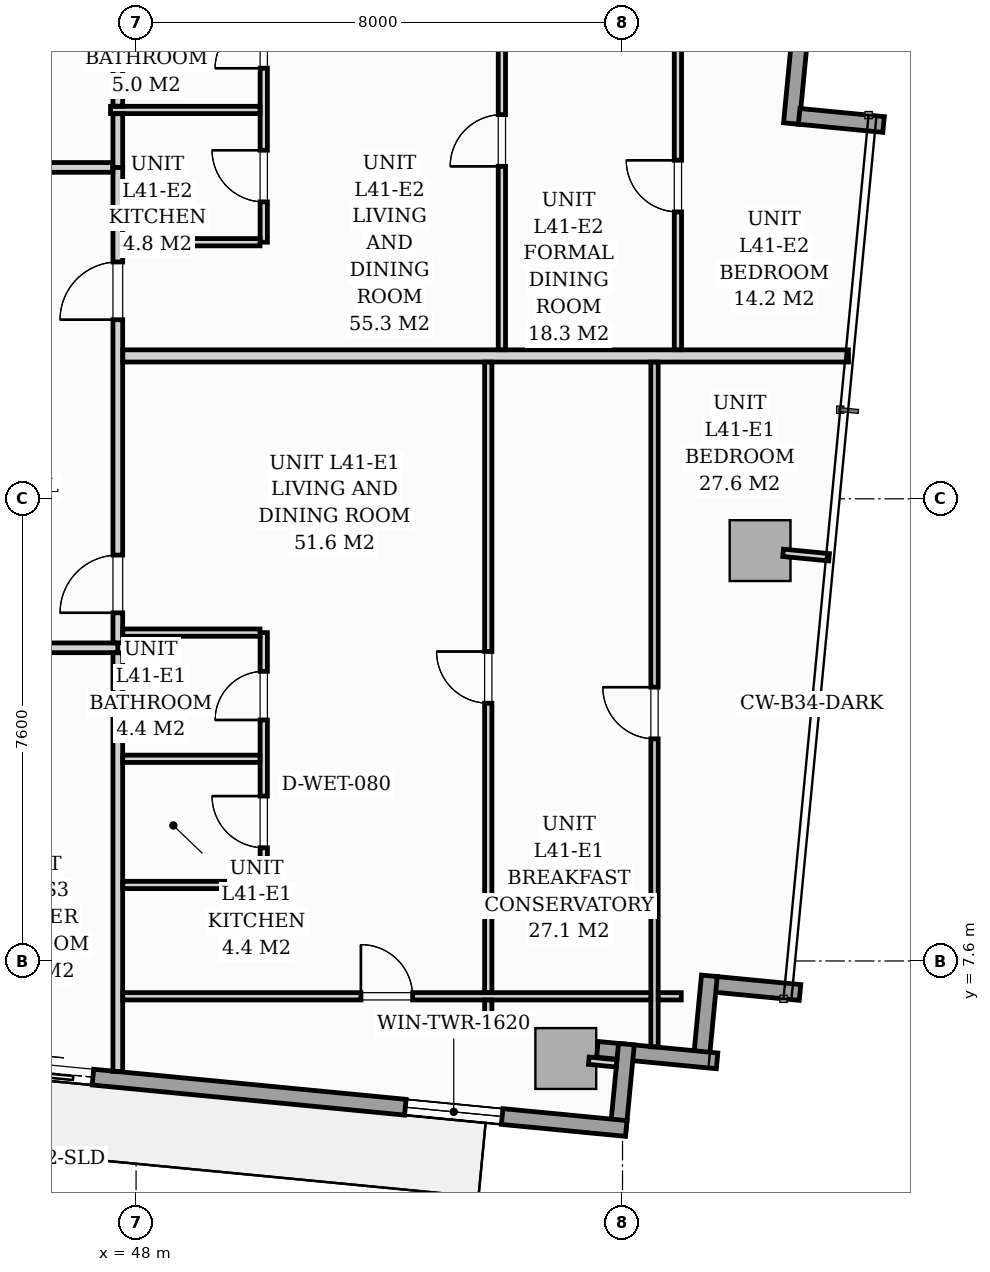
"""IFC4 building model, lengths in metres.
Left out: names, types, materials, properties, quantities, classifications, styles, units other than length and angle.
Written with IfcOpenShell. Run it as: python <this file> out.ifc"""

import sys

from ifc_helpers import new_model, si_unit, direction, frame, frame_2d, origin, origin_2d, place, context, subcontext, project, spatial, rectangle, extrude, source, transform, mapped, element, fill, save


model = new_model("IFC4")
c1 = context("Model", 3, precision=1e-05, world=origin(), true_north=direction((0.0, 1.0)))
c2 = subcontext(c1, "Body", "Model", "MODEL_VIEW")
j1 = project(units=[si_unit("LENGTHUNIT", "METRE"), si_unit("PLANEANGLEUNIT", "RADIAN")], contexts=[c1])
p1 = place(None, origin())
s1 = spatial("IfcSite", under=j1, at=p1, CompositionType="ELEMENT")
p2 = place(p1, origin())
s2 = spatial("IfcBuilding", under=s1, at=p2, CompositionType="ELEMENT")
p3 = place(p2, frame((0.0, 0.0, 143.8)))
s3 = spatial("IfcBuildingStorey", under=s2, at=p3, CompositionType="ELEMENT", Elevation=143.8)
m1 = source(origin(), c2, "Body", "SweptSolid", [
    extrude(rectangle(XDim=1.0, YDim=1.0, at=origin_2d()), origin(), (0.0, 0.0, 1.0), 3.196),
])
for number, where, z_axis, x_axis in (
    (1, (55.067, 5.996, 0.002), (0.0, 0.0, 1.0), (0.995, -0.096, 0.0)),
    (2, (58.262, 14.348, 0.002), (0.0, 0.0, 1.0), (0.995, -0.096, 0.0)),
):
    element("IfcColumn", number, at=place(p3, frame(where, z_axis=z_axis, x_axis=x_axis)), inside=s3, PredefinedType="COLUMN", context=c2, shape_type="MappedRepresentation", body=[
        mapped(m1, transform((0.0, 0.0, 0.0), scale=1.0)),
    ])
for number, where, z_axis, x_axis in (
    (3, (58.912, 22.76, 0.0), (0.0, 0.0, 1.0), (-0.096, -0.995, 0.0)),
    (4, (58.905, 21.49, 0.0), (0.0, 0.0, 1.0), (0.995, -0.096, 0.0)),
):
    element("IfcWall", number, at=place(p3, frame(where, z_axis=z_axis, x_axis=x_axis)), inside=s3, PredefinedType="STANDARD", context=c2, shape_type="SweptSolid", body=[
        extrude(rectangle(XDim=1.395, YDim=0.26, at=frame_2d((0.698, 0.0))), origin(), (0.0, 0.0, 1.0), 2.94),
    ])
for number, where, z_axis, x_axis in (
    (5, (58.919, 7.082, 0.0), (0.0, 0.0, 1.0), (-0.995, 0.096, 0.0)),
    (6, (57.428, 7.356, 0.0), (0.0, 0.0, 1.0), (-0.096, -0.995, 0.0)),
):
    element("IfcWall", number, at=place(p3, frame(where, z_axis=z_axis, x_axis=x_axis)), inside=s3, PredefinedType="STANDARD", context=c2, shape_type="SweptSolid", body=[
        extrude(rectangle(XDim=1.395, YDim=0.26, at=frame_2d((0.697, 0.0))), origin(), (0.0, 0.0, 1.0), 2.94),
    ])
p4 = place(p3, frame((57.555, 5.958, 0.0), z_axis=(0.0, 0.0, 1.0), x_axis=(-0.995401789159, 0.095787672171, 0.0)))
e7 = element("IfcWall", 7, at=p4, inside=s3, PredefinedType="STANDARD", context=c2, shape_type="SweptSolid", body=[
    extrude(rectangle(XDim=1.978, YDim=0.26, at=frame_2d((0.989, 0.0))), origin(), (0.0, 0.0, 1.0), 2.94),
])
p5 = place(p3, frame((56.064, 6.232, 0.0), z_axis=(0.0, 0.0, 1.0), x_axis=(-0.09589913835, -0.995391056452, 0.0)))
e8 = element("IfcWall", 8, at=p5, inside=s3, PredefinedType="STANDARD", context=c2, shape_type="SweptSolid", body=[
    extrude(rectangle(XDim=1.395, YDim=0.26, at=frame_2d((0.698, 0.0))), origin(), (0.0, 0.0, 1.0), 2.94),
])
p6 = place(p3, frame((56.061, 4.845, 0.0), z_axis=(0.0, 0.0, 1.0), x_axis=(-0.995395976631, 0.095848055311, 0.0)))
e9 = element("IfcWall", 9, at=p6, inside=s3, PredefinedType="STANDARD", context=c2, shape_type="SweptSolid", body=[
    extrude(rectangle(XDim=17.01, YDim=0.26, at=frame_2d((8.505, 0.0))), origin(), (0.0, 0.0, 1.0), 2.94),
])
p7 = place(p6, frame((8.811, 0.0, 0.0)))
e10 = element("IfcOpeningElement", 10, at=p7, cuts=e9, PredefinedType="OPENING", context=c2, shape_type="SweptSolid", body=[
    extrude(rectangle(XDim=1.8, YDim=2.06, at=frame_2d((0.9, 1.03))), frame((0.0, 0.14, 0.0), z_axis=(0.0, -1.0, 0.0), x_axis=(1.0, 0.0, 0.0)), (0.0, 0.0, 1.0), 0.28),
])
p8 = place(p6, frame((2.05, 0.0, 0.65)))
e11 = element("IfcOpeningElement", 11, at=p8, cuts=e9, PredefinedType="OPENING", context=c2, shape_type="SweptSolid", body=[
    extrude(rectangle(XDim=1.6, YDim=1.5, at=frame_2d((0.8, 0.75))), frame((0.0, 0.14, 0.0), z_axis=(0.0, -1.0, 0.0), x_axis=(1.0, 0.0, 0.0)), (0.0, 0.0, 1.0), 0.28),
])
p9 = place(p3, frame((22.05, 12.75, 0.0), z_axis=(0.0, 0.0, 1.0), x_axis=(1.0, 0.0, 0.0)))
e12 = element("IfcWall", 12, at=p9, inside=s3, PredefinedType="PARTITIONING", context=c2, shape_type="SweptSolid", body=[
    extrude(rectangle(XDim=25.65, YDim=0.16, at=frame_2d((12.825, 0.0))), origin(), (0.0, 0.0, 1.0), 2.94),
])
p10 = place(p9, frame((1.312, 0.0, 0.0)))
e13 = element("IfcOpeningElement", 13, at=p10, cuts=e12, PredefinedType="OPENING", context=c2, shape_type="SweptSolid", body=[
    extrude(rectangle(XDim=0.95, YDim=2.06, at=frame_2d((0.475, 1.03))), frame((0.0, 0.09, 0.0), z_axis=(0.0, -1.0, 0.0), x_axis=(1.0, 0.0, 0.0)), (0.0, 0.0, 1.0), 0.18),
])
p11 = place(p9, frame((8.281, 0.0, 0.0)))
e14 = element("IfcOpeningElement", 14, at=p11, cuts=e12, PredefinedType="OPENING", context=c2, shape_type="SweptSolid", body=[
    extrude(rectangle(XDim=0.95, YDim=2.06, at=frame_2d((0.475, 1.03))), frame((0.0, 0.09, 0.0), z_axis=(0.0, -1.0, 0.0), x_axis=(1.0, 0.0, 0.0)), (0.0, 0.0, 1.0), 0.18),
])
p12 = place(p9, frame((17.268, 0.0, 0.0)))
e15 = element("IfcOpeningElement", 15, at=p12, cuts=e12, PredefinedType="OPENING", context=c2, shape_type="SweptSolid", body=[
    extrude(rectangle(XDim=0.95, YDim=2.06, at=frame_2d((0.475, 1.03))), frame((0.0, 0.09, 0.0), z_axis=(0.0, -1.0, 0.0), x_axis=(1.0, 0.0, 0.0)), (0.0, 0.0, 1.0), 0.18),
])
p13 = place(p3, frame((47.7, 5.783, 0.0), z_axis=(0.0, 0.0, 1.0), x_axis=(0.0, 1.0, 0.0)))
e16 = element("IfcWall", 16, at=p13, inside=s3, PredefinedType="PARTITIONING", context=c2, shape_type="SweptSolid", body=[
    extrude(rectangle(XDim=6.885, YDim=0.16, at=frame_2d((3.442, 0.0))), origin(), (0.0, 0.0, 1.0), 2.94),
])
p14 = place(p3, frame((47.7, 12.832, 0.0), z_axis=(0.0, 0.0, 1.0), x_axis=(0.0, 1.0, 0.0)))
e17 = element("IfcWall", 17, at=p14, inside=s3, PredefinedType="PARTITIONING", context=c2, shape_type="SweptSolid", body=[
    extrude(rectangle(XDim=7.818, YDim=0.16, at=frame_2d((3.909, 0.0))), origin(), (0.0, 0.0, 1.0), 2.94),
])
p15 = place(p14, frame((0.493, 0.0, 0.0)))
e18 = element("IfcOpeningElement", 18, at=p15, cuts=e17, PredefinedType="OPENING", context=c2, shape_type="SweptSolid", body=[
    extrude(rectangle(XDim=0.95, YDim=2.06, at=frame_2d((0.475, 1.03))), frame((0.0, 0.09, 0.0), z_axis=(0.0, -1.0, 0.0), x_axis=(1.0, 0.0, 0.0)), (0.0, 0.0, 1.0), 0.18),
])
p16 = place(p14, frame((5.313, 0.0, 0.0)))
e19 = element("IfcOpeningElement", 19, at=p16, cuts=e17, PredefinedType="OPENING", context=c2, shape_type="SweptSolid", body=[
    extrude(rectangle(XDim=0.95, YDim=2.06, at=frame_2d((0.475, 1.03))), frame((0.0, 0.09, 0.0), z_axis=(0.0, -1.0, 0.0), x_axis=(1.0, 0.0, 0.0)), (0.0, 0.0, 1.0), 0.18),
])
p17 = place(p3, frame((45.902, 20.65, 0.0), z_axis=(0.0, 0.0, 1.0), x_axis=(1.0, 0.0, 0.0)))
e20 = element("IfcWall", 20, at=p17, inside=s3, PredefinedType="PARTITIONING", context=c2, shape_type="SweptSolid", body=[
    extrude(rectangle(XDim=1.716, YDim=0.16, at=frame_2d((0.858, 0.0))), origin(), (0.0, 0.0, 1.0), 2.94),
])
p18 = place(p3, frame((47.782, 17.55, 0.0), z_axis=(0.0, 0.0, 1.0), x_axis=(1.0, 0.0, 0.0)))
e21 = element("IfcWall", 21, at=p18, inside=s3, PredefinedType="PARTITIONING", context=c2, shape_type="SweptSolid", body=[
    extrude(rectangle(XDim=11.934, YDim=0.2, at=frame_2d((5.967, 0.0))), origin(), (0.0, 0.0, 1.0), 2.94),
])
p19 = place(p3, frame((50.1, 8.85, 0.0), z_axis=(0.0, 0.0, 1.0), x_axis=(0.0, 1.0, 0.0)))
e22 = element("IfcWall", 22, at=p19, inside=s3, PredefinedType="PARTITIONING", context=c2, shape_type="SweptSolid", body=[
    extrude(rectangle(XDim=4.15, YDim=0.12, at=frame_2d((2.075, 0.0))), origin(), (0.0, 0.0, 1.0), 2.94),
])
p20 = place(p19, frame((0.612, 0.0, 0.0)))
e23 = element("IfcOpeningElement", 23, at=p20, cuts=e22, PredefinedType="OPENING", context=c2, shape_type="SweptSolid", body=[
    extrude(rectangle(XDim=0.85, YDim=2.05, at=frame_2d((0.425, 1.025))), frame((0.0, 0.07, 0.0), z_axis=(0.0, -1.0, 0.0), x_axis=(1.0, 0.0, 0.0)), (0.0, 0.0, 1.0), 0.14),
])
p21 = place(p19, frame((2.713, 0.0, 0.0)))
e24 = element("IfcOpeningElement", 24, at=p21, cuts=e22, PredefinedType="OPENING", context=c2, shape_type="SweptSolid", body=[
    extrude(rectangle(XDim=0.8, YDim=2.02, at=frame_2d((0.4, 1.01))), frame((0.0, 0.07, 0.0), z_axis=(0.0, -1.0, 0.0), x_axis=(1.0, 0.0, 0.0)), (0.0, 0.0, 1.0), 0.14),
])
for number, where, z_axis, x_axis in (
    (25, (47.782, 10.925, 0.0), (0.0, 0.0, 1.0), (1.0, 0.0, 0.0)),
    (26, (47.782, 8.85, 0.0), (0.0, 0.0, 1.0), (1.0, 0.0, 0.0)),
    (27, (47.782, 13.0, 0.0), (0.0, 0.0, 1.0), (1.0, 0.0, 0.0)),
):
    element("IfcWall", number, at=place(p3, frame(where, z_axis=z_axis, x_axis=x_axis)), inside=s3, PredefinedType="PARTITIONING", context=c2, shape_type="SweptSolid", body=[
        extrude(rectangle(XDim=2.256, YDim=0.12, at=frame_2d((1.128, 0.0))), origin(), (0.0, 0.0, 1.0), 2.94),
    ])
p22 = place(p3, frame((56.526, 6.189, 0.0), z_axis=(0.0, 0.0, 1.0), x_axis=(0.0, 1.0, 0.0)))
e28 = element("IfcWall", 28, at=p22, inside=s3, PredefinedType="PARTITIONING", context=c2, shape_type="SweptSolid", body=[
    extrude(rectangle(XDim=11.259, YDim=0.12, at=frame_2d((5.629, 0.0))), origin(), (0.0, 0.0, 1.0), 2.94),
])
p23 = place(p22, frame((5.064, 0.0, 0.0)))
e29 = element("IfcOpeningElement", 29, at=p23, cuts=e28, PredefinedType="OPENING", context=c2, shape_type="SweptSolid", body=[
    extrude(rectangle(XDim=0.85, YDim=2.05, at=frame_2d((0.425, 1.025))), frame((0.0, 0.07, 0.0), z_axis=(0.0, -1.0, 0.0), x_axis=(1.0, 0.0, 0.0)), (0.0, 0.0, 1.0), 0.14),
])
p24 = place(p3, frame((47.782, 7.019, 0.0), z_axis=(0.0, 0.0, 1.0), x_axis=(1.0, 0.0, 0.0)))
e30 = element("IfcWall", 30, at=p24, inside=s3, PredefinedType="PARTITIONING", context=c2, shape_type="SweptSolid", body=[
    extrude(rectangle(XDim=8.682, YDim=0.12, at=frame_2d((4.341, 0.0))), origin(), (0.0, 0.0, 1.0), 2.94),
])
p25 = place(p24, frame((3.916, 0.0, 0.0)))
e31 = element("IfcOpeningElement", 31, at=p25, cuts=e30, PredefinedType="OPENING", context=c2, shape_type="SweptSolid", body=[
    extrude(rectangle(XDim=0.85, YDim=2.05, at=frame_2d((0.425, 1.025))), frame((0.0, 0.07, 0.0), z_axis=(0.0, -1.0, 0.0), x_axis=(1.0, 0.0, 0.0)), (0.0, 0.0, 1.0), 0.14),
])
p26 = place(p3, frame((56.588, 7.019, 0.0), z_axis=(0.0, 0.0, 1.0), x_axis=(1.0, 0.0, 0.0)))
e32 = element("IfcWall", 32, at=p26, inside=s3, PredefinedType="PARTITIONING", context=c2, shape_type="SweptSolid", body=[
    extrude(rectangle(XDim=0.378, YDim=0.12, at=frame_2d((0.189, 0.0))), origin(), (0.0, 0.0, 1.0), 2.94),
])
p27 = place(p3, frame((53.792, 6.579, 0.0), z_axis=(0.0, 0.0, 1.0), x_axis=(0.0, 1.0, 0.0)))
e33 = element("IfcWall", 33, at=p27, inside=s3, PredefinedType="PARTITIONING", context=c2, shape_type="SweptSolid", body=[
    extrude(rectangle(XDim=0.378, YDim=0.12, at=frame_2d((0.189, 0.0))), origin(), (0.0, 0.0, 1.0), 2.94),
])
p28 = place(p3, frame((53.792, 7.081, 0.0), z_axis=(0.0, 0.0, 1.0), x_axis=(0.0, 1.0, 0.0)))
e34 = element("IfcWall", 34, at=p28, inside=s3, PredefinedType="PARTITIONING", context=c2, shape_type="SweptSolid", body=[
    extrude(rectangle(XDim=10.367, YDim=0.12, at=frame_2d((5.184, 0.0))), origin(), (0.0, 0.0, 1.0), 2.94),
])
p29 = place(p28, frame((4.758, 0.0, 0.0)))
e35 = element("IfcOpeningElement", 35, at=p29, cuts=e34, PredefinedType="OPENING", context=c2, shape_type="SweptSolid", body=[
    extrude(rectangle(XDim=0.85, YDim=2.05, at=frame_2d((0.425, 1.025))), frame((0.0, 0.07, 0.0), z_axis=(0.0, -1.0, 0.0), x_axis=(1.0, 0.0, 0.0)), (0.0, 0.0, 1.0), 0.14),
])
p30 = place(p3, frame((50.1, 19.42, 0.0), z_axis=(0.0, 0.0, 1.0), x_axis=(0.0, 1.0, 0.0)))
e36 = element("IfcWall", 36, at=p30, inside=s3, PredefinedType="PARTITIONING", context=c2, shape_type="SweptSolid", body=[
    extrude(rectangle(XDim=4.35, YDim=0.12, at=frame_2d((2.175, 0.0))), origin(), (0.0, 0.0, 1.0), 2.94),
])
p31 = place(p30, frame((0.663, 0.0, 0.0)))
e37 = element("IfcOpeningElement", 37, at=p31, cuts=e36, PredefinedType="OPENING", context=c2, shape_type="SweptSolid", body=[
    extrude(rectangle(XDim=0.85, YDim=2.05, at=frame_2d((0.425, 1.025))), frame((0.0, 0.07, 0.0), z_axis=(0.0, -1.0, 0.0), x_axis=(1.0, 0.0, 0.0)), (0.0, 0.0, 1.0), 0.14),
])
p32 = place(p30, frame((2.862, 0.0, 0.0)))
e38 = element("IfcOpeningElement", 38, at=p32, cuts=e36, PredefinedType="OPENING", context=c2, shape_type="SweptSolid", body=[
    extrude(rectangle(XDim=0.8, YDim=2.02, at=frame_2d((0.4, 1.01))), frame((0.0, 0.07, 0.0), z_axis=(0.0, -1.0, 0.0), x_axis=(1.0, 0.0, 0.0)), (0.0, 0.0, 1.0), 0.14),
])
p33 = place(p3, frame((47.58, 21.595, 0.0), z_axis=(0.0, 0.0, 1.0), x_axis=(1.0, 0.0, 0.0)))
e39 = element("IfcWall", 39, at=p33, inside=s3, PredefinedType="PARTITIONING", context=c2, shape_type="SweptSolid", body=[
    extrude(rectangle(XDim=2.458, YDim=0.12, at=frame_2d((1.229, 0.0))), origin(), (0.0, 0.0, 1.0), 2.94),
])
p34 = place(p3, frame((47.782, 19.42, 0.0), z_axis=(0.0, 0.0, 1.0), x_axis=(1.0, 0.0, 0.0)))
e40 = element("IfcWall", 40, at=p34, inside=s3, PredefinedType="PARTITIONING", context=c2, shape_type="SweptSolid", body=[
    extrude(rectangle(XDim=2.256, YDim=0.12, at=frame_2d((1.128, 0.0))), origin(), (0.0, 0.0, 1.0), 2.94),
])
p35 = place(p3, frame((47.7, 20.65, 0.0), z_axis=(0.0, 0.0, 1.0), x_axis=(0.0, 1.0, 0.0)))
e41 = element("IfcWall", 41, at=p35, inside=s3, PredefinedType="PARTITIONING", context=c2, shape_type="SweptSolid", body=[
    extrude(rectangle(XDim=0.883, YDim=0.16, at=frame_2d((0.441, 0.0))), origin(), (0.0, 0.0, 1.0), 2.94),
])
p36 = place(p3, frame((47.7, 21.657, 0.0), z_axis=(0.0, 0.0, 1.0), x_axis=(0.0, 1.0, 0.0)))
e42 = element("IfcWall", 42, at=p36, inside=s3, PredefinedType="PARTITIONING", context=c2, shape_type="SweptSolid", body=[
    extrude(rectangle(XDim=2.051, YDim=0.16, at=frame_2d((1.025, 0.0))), origin(), (0.0, 0.0, 1.0), 2.94),
])
p37 = place(p3, frame((56.911, 17.652, 0.0), z_axis=(0.0, 0.0, 1.0), x_axis=(0.0, 1.0, 0.0)))
e43 = element("IfcWall", 43, at=p37, inside=s3, PredefinedType="PARTITIONING", context=c2, shape_type="SweptSolid", body=[
    extrude(rectangle(XDim=6.408, YDim=0.12, at=frame_2d((3.204, 0.0))), origin(), (0.0, 0.0, 1.0), 2.383),
])
p38 = place(p37, frame((2.266, 0.0, 0.0)))
e44 = element("IfcOpeningElement", 44, at=p38, cuts=e43, PredefinedType="OPENING", context=c2, shape_type="SweptSolid", body=[
    extrude(rectangle(XDim=0.85, YDim=2.05, at=frame_2d((0.425, 1.025))), frame((0.0, 0.07, 0.0), z_axis=(0.0, -1.0, 0.0), x_axis=(1.0, 0.0, 0.0)), (0.0, 0.0, 1.0), 0.14),
])
p39 = place(p3, frame((54.016, 17.652, 0.0), z_axis=(0.0, 0.0, 1.0), x_axis=(0.0, 1.0, 0.0)))
e45 = element("IfcWall", 45, at=p39, inside=s3, PredefinedType="PARTITIONING", context=c2, shape_type="SweptSolid", body=[
    extrude(rectangle(XDim=6.687, YDim=0.12, at=frame_2d((3.344, 0.0))), origin(), (0.0, 0.0, 1.0), 2.94),
])
p40 = place(p39, frame((3.016, 0.0, 0.0)))
e46 = element("IfcOpeningElement", 46, at=p40, cuts=e45, PredefinedType="OPENING", context=c2, shape_type="SweptSolid", body=[
    extrude(rectangle(XDim=0.85, YDim=2.05, at=frame_2d((0.425, 1.025))), frame((0.0, 0.07, 0.0), z_axis=(0.0, -1.0, 0.0), x_axis=(1.0, 0.0, 0.0)), (0.0, 0.0, 1.0), 0.14),
])
p41 = place(p3, frame((55.445, 5.96, 0.0), z_axis=(0.0, 0.0, 1.0), x_axis=(0.995384576284, -0.09596637586, 0.0)))
e47 = element("IfcWall", 47, at=p41, inside=s3, PredefinedType="PARTITIONING", context=c2, shape_type="SweptSolid", body=[
    extrude(rectangle(XDim=0.458, YDim=0.12, at=frame_2d((0.229, 0.0))), origin(), (0.0, 0.0, 1.0), 2.94),
])
p42 = place(p3, frame((58.64, 14.312, 0.0), z_axis=(0.0, 0.0, 1.0), x_axis=(0.995377786728, -0.096036772582, 0.0)))
e48 = element("IfcWall", 48, at=p42, inside=s3, PredefinedType="PARTITIONING", context=c2, shape_type="SweptSolid", body=[
    extrude(rectangle(XDim=0.76, YDim=0.12, at=frame_2d((0.38, 0.0))), origin(), (0.0, 0.0, 1.0), 2.94),
])
m2 = source(origin(), c2, "Body", "SweptSolid", [
    extrude(rectangle(XDim=1.8, YDim=2.06, at=frame_2d((0.9, 1.03))), frame((0.0, 0.025, 0.0), z_axis=(0.0, -1.0, 0.0), x_axis=(1.0, 0.0, 0.0)), (0.0, 0.0, 1.0), 0.05),
])
p43 = place(p7, origin())
e49 = element("IfcDoor", 49, at=p43, inside=s3, OperationType="SLIDING_TO_RIGHT", PredefinedType="DOOR", context=c2, shape_type="MappedRepresentation", body=[
    mapped(m2, transform((0.0, 0.0, 0.0), scale=1.0)),
])
fill(e10, e49)
m3 = source(origin(), c2, "Body", "SweptSolid", [
    extrude(rectangle(XDim=1.6, YDim=1.5, at=frame_2d((0.8, 0.75))), frame((0.0, 0.03, 0.0), z_axis=(0.0, -1.0, 0.0), x_axis=(1.0, 0.0, 0.0)), (0.0, 0.0, 1.0), 0.06),
])
p44 = place(p8, origin())
e50 = element("IfcWindow", 50, at=p44, inside=s3, PartitioningType="SINGLE_PANEL", PredefinedType="WINDOW", context=c2, shape_type="MappedRepresentation", body=[
    mapped(m3, transform((0.0, 0.0, 0.0), scale=1.0)),
])
fill(e11, e50)
m4 = source(origin(), c2, "Body", "SweptSolid", [
    extrude(rectangle(XDim=0.95, YDim=2.06, at=frame_2d((0.475, 1.03))), frame((0.0, 0.025, 0.0), z_axis=(0.0, -1.0, 0.0), x_axis=(1.0, 0.0, 0.0)), (0.0, 0.0, 1.0), 0.05),
])
p45 = place(p15, origin())
e51 = element("IfcDoor", 51, at=p45, inside=s3, OperationType="SINGLE_SWING_LEFT", PredefinedType="DOOR", context=c2, shape_type="MappedRepresentation", body=[
    mapped(m4, transform((0.0, 0.0, 0.0), scale=1.0)),
])
fill(e18, e51)
m5 = source(origin(), c2, "Body", "SweptSolid", [
    extrude(rectangle(XDim=0.85, YDim=2.05, at=frame_2d((0.425, 1.025))), frame((0.0, 0.025, 0.0), z_axis=(0.0, -1.0, 0.0), x_axis=(1.0, 0.0, 0.0)), (0.0, 0.0, 1.0), 0.05),
])
p46 = place(p20, origin())
e52 = element("IfcDoor", 52, at=p46, inside=s3, OperationType="SINGLE_SWING_RIGHT", PredefinedType="DOOR", context=c2, shape_type="MappedRepresentation", body=[
    mapped(m5, transform((0.0, 0.0, 0.0), scale=1.0)),
])
fill(e23, e52)
m6 = source(origin(), c2, "Body", "SweptSolid", [
    extrude(rectangle(XDim=0.8, YDim=2.02, at=frame_2d((0.4, 1.01))), frame((0.0, 0.025, 0.0), z_axis=(0.0, -1.0, 0.0), x_axis=(1.0, 0.0, 0.0)), (0.0, 0.0, 1.0), 0.05),
])
p47 = place(p21, origin())
e53 = element("IfcDoor", 53, at=p47, inside=s3, OperationType="SINGLE_SWING_LEFT", PredefinedType="DOOR", context=c2, shape_type="MappedRepresentation", body=[
    mapped(m6, transform((0.0, 0.0, 0.0), scale=1.0)),
])
fill(e24, e53)
p48 = place(p23, origin())
e54 = element("IfcDoor", 54, at=p48, inside=s3, OperationType="SINGLE_SWING_RIGHT", PredefinedType="DOOR", context=c2, shape_type="MappedRepresentation", body=[
    mapped(m5, transform((0.0, 0.0, 0.0), scale=1.0)),
])
fill(e29, e54)
p49 = place(p25, origin())
e55 = element("IfcDoor", 55, at=p49, inside=s3, OperationType="SINGLE_SWING_LEFT", PredefinedType="DOOR", context=c2, shape_type="MappedRepresentation", body=[
    mapped(m5, transform((0.0, 0.0, 0.0), scale=1.0)),
])
fill(e31, e55)
p50 = place(p29, origin())
e56 = element("IfcDoor", 56, at=p50, inside=s3, OperationType="SINGLE_SWING_RIGHT", PredefinedType="DOOR", context=c2, shape_type="MappedRepresentation", body=[
    mapped(m5, transform((0.0, 0.0, 0.0), scale=1.0)),
])
fill(e35, e56)
p51 = place(p16, origin())
e57 = element("IfcDoor", 57, at=p51, inside=s3, OperationType="SINGLE_SWING_LEFT", PredefinedType="DOOR", context=c2, shape_type="MappedRepresentation", body=[
    mapped(m4, transform((0.0, 0.0, 0.0), scale=1.0)),
])
fill(e19, e57)
p52 = place(p31, origin())
e58 = element("IfcDoor", 58, at=p52, inside=s3, OperationType="SINGLE_SWING_RIGHT", PredefinedType="DOOR", context=c2, shape_type="MappedRepresentation", body=[
    mapped(m5, transform((0.0, 0.0, 0.0), scale=1.0)),
])
fill(e37, e58)
p53 = place(p32, origin())
e59 = element("IfcDoor", 59, at=p53, inside=s3, OperationType="SINGLE_SWING_LEFT", PredefinedType="DOOR", context=c2, shape_type="MappedRepresentation", body=[
    mapped(m6, transform((0.0, 0.0, 0.0), scale=1.0)),
])
fill(e38, e59)
p54 = place(p38, origin())
e60 = element("IfcDoor", 60, at=p54, inside=s3, OperationType="SINGLE_SWING_RIGHT", PredefinedType="DOOR", context=c2, shape_type="MappedRepresentation", body=[
    mapped(m5, transform((0.0, 0.0, 0.0), scale=1.0)),
])
fill(e44, e60)
p55 = place(p40, origin())
e61 = element("IfcDoor", 61, at=p55, inside=s3, OperationType="SINGLE_SWING_LEFT", PredefinedType="DOOR", context=c2, shape_type="MappedRepresentation", body=[
    mapped(m5, transform((0.0, 0.0, 0.0), scale=1.0)),
])
fill(e46, e61)
save(model, sys.argv[1])
